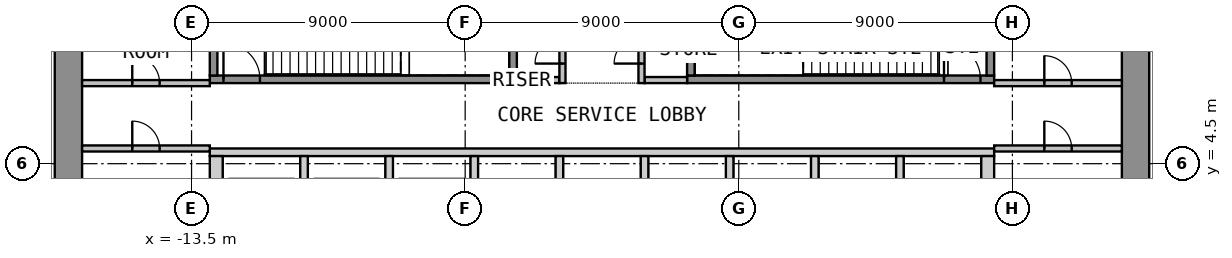
"""IFC4 building model, lengths in metres.
Left out: names, types, materials, properties, quantities, classifications, styles, units other than length and angle.
Written with IfcOpenShell. Run it as: python <this file> out.ifc"""

import sys

from ifc_helpers import new_model, si_unit, direction, frame, frame_2d, origin, place, context, subcontext, project, spatial, polyline, rectangle, outline, extrude, element, fill, save


model = new_model("IFC4")
c1 = context("Model", 3, precision=1e-05, world=origin(), true_north=direction((0.0, 1.0)))
c2 = subcontext(c1, "Body", "Model", "MODEL_VIEW")
j1 = project(units=[si_unit("LENGTHUNIT", "METRE"), si_unit("PLANEANGLEUNIT", "RADIAN")], contexts=[c1])
p1 = place(None, origin())
s1 = spatial("IfcSite", under=j1, at=p1, CompositionType="ELEMENT")
p2 = place(p1, origin())
s2 = spatial("IfcBuilding", under=s1, at=p2, CompositionType="ELEMENT")
p3 = place(p2, origin())
s3 = spatial("IfcBuildingStorey", under=s2, at=p3, CompositionType="ELEMENT", Elevation=0.0)
p4 = place(p3, frame((-17.55, -12.6, 0.0), z_axis=(0.0, 0.0, 1.0), x_axis=(0.0, 1.0, 0.0)))
e1 = element("IfcWall", 1, at=p4, inside=s3, PredefinedType="SHEAR", context=c2, shape_type="SweptSolid", body=[
    extrude(rectangle(XDim=25.2, YDim=0.9, at=frame_2d((12.6, 0.0))), origin(), (0.0, 0.0, 1.0), 5.6),
])
p5 = place(p4, frame((11.4, 0.0, 0.0)))
e2 = element("IfcOpeningElement", 2, at=p5, cuts=e1, PredefinedType="OPENING", context=c2, shape_type="SweptSolid", body=[
    extrude(rectangle(XDim=2.4, YDim=2.1, at=frame_2d((1.2, 1.05))), frame((0.0, 0.46, 0.0), z_axis=(0.0, -1.0, 0.0), x_axis=(1.0, 0.0, 0.0)), (0.0, 0.0, 1.0), 0.92),
])
p6 = place(p3, frame((17.55, -12.6, 0.0), z_axis=(0.0, 0.0, 1.0), x_axis=(0.0, 1.0, 0.0)))
e3 = element("IfcWall", 3, at=p6, inside=s3, PredefinedType="SHEAR", context=c2, shape_type="SweptSolid", body=[
    extrude(rectangle(XDim=25.2, YDim=0.9, at=frame_2d((12.6, 0.0))), origin(), (0.0, 0.0, 1.0), 5.6),
])
p7 = place(p6, frame((11.4, 0.0, 0.0)))
e4 = element("IfcOpeningElement", 4, at=p7, cuts=e3, PredefinedType="OPENING", context=c2, shape_type="SweptSolid", body=[
    extrude(rectangle(XDim=2.4, YDim=2.1, at=frame_2d((1.2, 1.05))), frame((0.0, 0.46, 0.0), z_axis=(0.0, -1.0, 0.0), x_axis=(1.0, 0.0, 0.0)), (0.0, 0.0, 1.0), 0.92),
])
p8 = place(p3, origin())
e5 = element("IfcWall", 5, at=p8, inside=s3, PredefinedType="SHEAR", context=c2, shape_type="SweptSolid", body=[
    extrude(outline(polyline([(-12.9, 4.75), (12.9, 4.75), (12.9, 5.0), (-12.9, 5.0), (-12.9, 4.75)])), origin(), (0.0, 0.0, 1.0), 5.6),
])
p9 = place(p3, origin())
e6 = element("IfcWall", 6, at=p9, inside=s3, PredefinedType="SHEAR", context=c2, shape_type="SweptSolid", body=[
    extrude(outline(polyline([(-12.9, 2.05), (-12.475, 2.05), (-12.475, 4.75), (-12.9, 4.75), (-12.9, 2.05)])), origin(), (0.0, 0.0, 1.0), 5.6),
])
p10 = place(p3, origin())
e7 = element("IfcWall", 7, at=p10, inside=s3, PredefinedType="SHEAR", context=c2, shape_type="SweptSolid", body=[
    extrude(outline(polyline([(-9.925, 2.05), (-9.675, 2.05), (-9.675, 4.75), (-9.925, 4.75), (-9.925, 2.05)])), origin(), (0.0, 0.0, 1.0), 5.6),
])
p11 = place(p3, origin())
e8 = element("IfcWall", 8, at=p11, inside=s3, PredefinedType="SHEAR", context=c2, shape_type="SweptSolid", body=[
    extrude(outline(polyline([(-7.125, 2.05), (-6.875, 2.05), (-6.875, 4.75), (-7.125, 4.75), (-7.125, 2.05)])), origin(), (0.0, 0.0, 1.0), 5.6),
])
p12 = place(p3, origin())
e9 = element("IfcWall", 9, at=p12, inside=s3, PredefinedType="SHEAR", context=c2, shape_type="SweptSolid", body=[
    extrude(outline(polyline([(-4.325, 2.05), (-4.075, 2.05), (-4.075, 4.75), (-4.325, 4.75), (-4.325, 2.05)])), origin(), (0.0, 0.0, 1.0), 5.6),
])
p13 = place(p3, origin())
e10 = element("IfcWall", 10, at=p13, inside=s3, PredefinedType="SHEAR", context=c2, shape_type="SweptSolid", body=[
    extrude(outline(polyline([(-1.525, 2.05), (-1.275, 2.05), (-1.275, 4.75), (-1.525, 4.75), (-1.525, 2.05)])), origin(), (0.0, 0.0, 1.0), 5.6),
])
p14 = place(p3, origin())
e11 = element("IfcWall", 11, at=p14, inside=s3, PredefinedType="SHEAR", context=c2, shape_type="SweptSolid", body=[
    extrude(outline(polyline([(1.275, 2.05), (1.525, 2.05), (1.525, 4.75), (1.275, 4.75), (1.275, 2.05)])), origin(), (0.0, 0.0, 1.0), 5.6),
])
p15 = place(p3, origin())
e12 = element("IfcWall", 12, at=p15, inside=s3, PredefinedType="SHEAR", context=c2, shape_type="SweptSolid", body=[
    extrude(outline(polyline([(4.075, 2.05), (4.325, 2.05), (4.325, 4.75), (4.075, 4.75), (4.075, 2.05)])), origin(), (0.0, 0.0, 1.0), 5.6),
])
p16 = place(p3, origin())
e13 = element("IfcWall", 13, at=p16, inside=s3, PredefinedType="SHEAR", context=c2, shape_type="SweptSolid", body=[
    extrude(outline(polyline([(6.875, 2.05), (7.125, 2.05), (7.125, 4.75), (6.875, 4.75), (6.875, 2.05)])), origin(), (0.0, 0.0, 1.0), 5.6),
])
p17 = place(p3, origin())
e14 = element("IfcWall", 14, at=p17, inside=s3, PredefinedType="SHEAR", context=c2, shape_type="SweptSolid", body=[
    extrude(outline(polyline([(9.675, 2.05), (9.925, 2.05), (9.925, 4.75), (9.675, 4.75), (9.675, 2.05)])), origin(), (0.0, 0.0, 1.0), 5.6),
])
p18 = place(p3, origin())
e15 = element("IfcWall", 15, at=p18, inside=s3, PredefinedType="SHEAR", context=c2, shape_type="SweptSolid", body=[
    extrude(outline(polyline([(12.475, 2.05), (12.9, 2.05), (12.9, 4.75), (12.475, 4.75), (12.475, 2.05)])), origin(), (0.0, 0.0, 1.0), 5.6),
])
p19 = place(p3, frame((-12.9, 7.275, 0.0), z_axis=(0.0, 0.0, 1.0), x_axis=(1.0, 0.0, 0.0)))
e16 = element("IfcWall", 16, at=p19, inside=s3, PredefinedType="SHEAR", context=c2, shape_type="SweptSolid", body=[
    extrude(rectangle(XDim=10.1, YDim=0.25, at=frame_2d((5.05, 0.0))), origin(), (0.0, 0.0, 1.0), 5.6),
])
p20 = place(p19, frame((0.45, 0.0, 0.0)))
e17 = element("IfcOpeningElement", 17, at=p20, cuts=e16, PredefinedType="OPENING", context=c2, shape_type="SweptSolid", body=[
    extrude(rectangle(XDim=1.2, YDim=2.1, at=frame_2d((0.6, 1.05))), frame((0.0, 0.135, 0.0), z_axis=(0.0, -1.0, 0.0), x_axis=(1.0, 0.0, 0.0)), (0.0, 0.0, 1.0), 0.27),
])
for number, where, z_axis, x_axis in (
    (18, (-12.775, 7.4, 0.0), (0.0, 0.0, 1.0), (0.0, 1.0, 0.0)),
    (19, (-2.925, 7.4, 0.0), (0.0, 0.0, 1.0), (0.0, 1.0, 0.0)),
):
    element("IfcWall", number, at=place(p3, frame(where, z_axis=z_axis, x_axis=x_axis)), inside=s3, PredefinedType="SHEAR", context=c2, shape_type="SweptSolid", body=[
        extrude(rectangle(XDim=3.25, YDim=0.25, at=frame_2d((1.625, 0.0))), origin(), (0.0, 0.0, 1.0), 5.6),
    ])
p21 = place(p3, frame((2.8, 7.275, 0.0), z_axis=(0.0, 0.0, 1.0), x_axis=(1.0, 0.0, 0.0)))
e20 = element("IfcWall", 20, at=p21, inside=s3, PredefinedType="SHEAR", context=c2, shape_type="SweptSolid", body=[
    extrude(rectangle(XDim=10.1, YDim=0.25, at=frame_2d((5.05, 0.0))), origin(), (0.0, 0.0, 1.0), 5.6),
])
p22 = place(p21, frame((8.45, 0.0, 0.0)))
e21 = element("IfcOpeningElement", 21, at=p22, cuts=e20, PredefinedType="OPENING", context=c2, shape_type="SweptSolid", body=[
    extrude(rectangle(XDim=1.2, YDim=2.1, at=frame_2d((0.6, 1.05))), frame((0.0, 0.135, 0.0), z_axis=(0.0, -1.0, 0.0), x_axis=(1.0, 0.0, 0.0)), (0.0, 0.0, 1.0), 0.27),
])
for number, where, z_axis, x_axis in (
    (22, (2.925, 7.4, 0.0), (0.0, 0.0, 1.0), (0.0, 1.0, 0.0)),
    (23, (12.775, 7.4, 0.0), (0.0, 0.0, 1.0), (0.0, 1.0, 0.0)),
):
    element("IfcWall", number, at=place(p3, frame(where, z_axis=z_axis, x_axis=x_axis)), inside=s3, PredefinedType="SHEAR", context=c2, shape_type="SweptSolid", body=[
        extrude(rectangle(XDim=3.25, YDim=0.25, at=frame_2d((1.625, 0.0))), origin(), (0.0, 0.0, 1.0), 5.6),
    ])
for number, where, z_axis, x_axis in (
    (24, (-2.8, 7.25, 0.0), (0.0, 0.0, 1.0), (1.0, 0.0, 0.0)),
    (25, (1.4, 7.25, 0.0), (0.0, 0.0, 1.0), (1.0, 0.0, 0.0)),
):
    element("IfcWall", number, at=place(p3, frame(where, z_axis=z_axis, x_axis=x_axis)), inside=s3, PredefinedType="PARTITIONING", context=c2, shape_type="SweptSolid", body=[
        extrude(rectangle(XDim=1.4, YDim=0.2, at=frame_2d((0.7, 0.0))), origin(), (0.0, 0.0, 1.0), 5.6),
    ])
p23 = place(p3, frame((-1.3, 7.15, 0.0), z_axis=(0.0, 0.0, 1.0), x_axis=(0.0, 1.0, 0.0)))
e26 = element("IfcWall", 26, at=p23, inside=s3, PredefinedType="PARTITIONING", context=c2, shape_type="SweptSolid", body=[
    extrude(rectangle(XDim=5.45, YDim=0.2, at=frame_2d((2.725, 0.0))), origin(), (0.0, 0.0, 1.0), 5.6),
])
p24 = place(p23, frame((0.643, 0.0, 0.0)))
e27 = element("IfcOpeningElement", 27, at=p24, cuts=e26, PredefinedType="OPENING", context=c2, shape_type="SweptSolid", body=[
    extrude(rectangle(XDim=0.9, YDim=2.1, at=frame_2d((0.45, 1.05))), frame((0.0, 0.11, 0.0), z_axis=(0.0, -1.0, 0.0), x_axis=(1.0, 0.0, 0.0)), (0.0, 0.0, 1.0), 0.22),
])
p25 = place(p23, frame((2.401, 0.0, 0.0)))
e28 = element("IfcOpeningElement", 28, at=p25, cuts=e26, PredefinedType="OPENING", context=c2, shape_type="SweptSolid", body=[
    extrude(rectangle(XDim=0.9, YDim=2.1, at=frame_2d((0.45, 1.05))), frame((0.0, 0.11, 0.0), z_axis=(0.0, -1.0, 0.0), x_axis=(1.0, 0.0, 0.0)), (0.0, 0.0, 1.0), 0.22),
])
p26 = place(p23, frame((4.134, 0.0, 0.0)))
e29 = element("IfcOpeningElement", 29, at=p26, cuts=e26, PredefinedType="OPENING", context=c2, shape_type="SweptSolid", body=[
    extrude(rectangle(XDim=0.9, YDim=2.1, at=frame_2d((0.45, 1.05))), frame((0.0, 0.11, 0.0), z_axis=(0.0, -1.0, 0.0), x_axis=(1.0, 0.0, 0.0)), (0.0, 0.0, 1.0), 0.22),
])
p27 = place(p3, frame((1.3, 7.15, 0.0), z_axis=(0.0, 0.0, 1.0), x_axis=(0.0, 1.0, 0.0)))
e30 = element("IfcWall", 30, at=p27, inside=s3, PredefinedType="PARTITIONING", context=c2, shape_type="SweptSolid", body=[
    extrude(rectangle(XDim=5.45, YDim=0.2, at=frame_2d((2.725, 0.0))), origin(), (0.0, 0.0, 1.0), 5.6),
])
p28 = place(p27, frame((0.643, 0.0, 0.0)))
e31 = element("IfcOpeningElement", 31, at=p28, cuts=e30, PredefinedType="OPENING", context=c2, shape_type="SweptSolid", body=[
    extrude(rectangle(XDim=0.9, YDim=2.1, at=frame_2d((0.45, 1.05))), frame((0.0, 0.11, 0.0), z_axis=(0.0, -1.0, 0.0), x_axis=(1.0, 0.0, 0.0)), (0.0, 0.0, 1.0), 0.22),
])
p29 = place(p27, frame((2.401, 0.0, 0.0)))
e32 = element("IfcOpeningElement", 32, at=p29, cuts=e30, PredefinedType="OPENING", context=c2, shape_type="SweptSolid", body=[
    extrude(rectangle(XDim=0.9, YDim=2.1, at=frame_2d((0.45, 1.05))), frame((0.0, 0.11, 0.0), z_axis=(0.0, -1.0, 0.0), x_axis=(1.0, 0.0, 0.0)), (0.0, 0.0, 1.0), 0.22),
])
p30 = place(p27, frame((4.134, 0.0, 0.0)))
e33 = element("IfcOpeningElement", 33, at=p30, cuts=e30, PredefinedType="OPENING", context=c2, shape_type="SweptSolid", body=[
    extrude(rectangle(XDim=0.9, YDim=2.1, at=frame_2d((0.45, 1.05))), frame((0.0, 0.11, 0.0), z_axis=(0.0, -1.0, 0.0), x_axis=(1.0, 0.0, 0.0)), (0.0, 0.0, 1.0), 0.22),
])
p31 = place(p3, frame((-17.1, 7.15, 0.0), z_axis=(0.0, 0.0, 1.0), x_axis=(1.0, 0.0, 0.0)))
e34 = element("IfcWall", 34, at=p31, inside=s3, PredefinedType="PARTITIONING", context=c2, shape_type="SweptSolid", body=[
    extrude(rectangle(XDim=4.2, YDim=0.2, at=frame_2d((2.1, 0.0))), origin(), (0.0, 0.0, 1.0), 5.6),
])
p32 = place(p31, frame((1.65, 0.0, 0.0)))
e35 = element("IfcOpeningElement", 35, at=p32, cuts=e34, PredefinedType="OPENING", context=c2, shape_type="SweptSolid", body=[
    extrude(rectangle(XDim=0.9, YDim=2.1, at=frame_2d((0.45, 1.05))), frame((0.0, 0.11, 0.0), z_axis=(0.0, -1.0, 0.0), x_axis=(1.0, 0.0, 0.0)), (0.0, 0.0, 1.0), 0.22),
])
p33 = place(p3, frame((-17.1, 5.0, 0.0), z_axis=(0.0, 0.0, 1.0), x_axis=(1.0, 0.0, 0.0)))
e36 = element("IfcWall", 36, at=p33, inside=s3, PredefinedType="PARTITIONING", context=c2, shape_type="SweptSolid", body=[
    extrude(rectangle(XDim=4.2, YDim=0.2, at=frame_2d((2.1, 0.0))), origin(), (0.0, 0.0, 1.0), 5.6),
])
p34 = place(p33, frame((1.65, 0.0, 0.0)))
e37 = element("IfcOpeningElement", 37, at=p34, cuts=e36, PredefinedType="OPENING", context=c2, shape_type="SweptSolid", body=[
    extrude(rectangle(XDim=0.9, YDim=2.1, at=frame_2d((0.45, 1.05))), frame((0.0, 0.11, 0.0), z_axis=(0.0, -1.0, 0.0), x_axis=(1.0, 0.0, 0.0)), (0.0, 0.0, 1.0), 0.22),
])
p35 = place(p3, frame((12.9, 7.15, 0.0), z_axis=(0.0, 0.0, 1.0), x_axis=(1.0, 0.0, 0.0)))
e38 = element("IfcWall", 38, at=p35, inside=s3, PredefinedType="PARTITIONING", context=c2, shape_type="SweptSolid", body=[
    extrude(rectangle(XDim=4.2, YDim=0.2, at=frame_2d((2.1, 0.0))), origin(), (0.0, 0.0, 1.0), 5.6),
])
p36 = place(p35, frame((1.65, 0.0, 0.0)))
e39 = element("IfcOpeningElement", 39, at=p36, cuts=e38, PredefinedType="OPENING", context=c2, shape_type="SweptSolid", body=[
    extrude(rectangle(XDim=0.9, YDim=2.1, at=frame_2d((0.45, 1.05))), frame((0.0, 0.11, 0.0), z_axis=(0.0, -1.0, 0.0), x_axis=(1.0, 0.0, 0.0)), (0.0, 0.0, 1.0), 0.22),
])
p37 = place(p3, frame((12.9, 5.0, 0.0), z_axis=(0.0, 0.0, 1.0), x_axis=(1.0, 0.0, 0.0)))
e40 = element("IfcWall", 40, at=p37, inside=s3, PredefinedType="PARTITIONING", context=c2, shape_type="SweptSolid", body=[
    extrude(rectangle(XDim=4.2, YDim=0.2, at=frame_2d((2.1, 0.0))), origin(), (0.0, 0.0, 1.0), 5.6),
])
p38 = place(p37, frame((1.65, 0.0, 0.0)))
e41 = element("IfcOpeningElement", 41, at=p38, cuts=e40, PredefinedType="OPENING", context=c2, shape_type="SweptSolid", body=[
    extrude(rectangle(XDim=0.9, YDim=2.1, at=frame_2d((0.45, 1.05))), frame((0.0, 0.11, 0.0), z_axis=(0.0, -1.0, 0.0), x_axis=(1.0, 0.0, 0.0)), (0.0, 0.0, 1.0), 0.22),
])
p39 = place(p20, origin())
e42 = element("IfcDoor", 42, at=p39, inside=s3, OperationType="SINGLE_SWING_LEFT", PredefinedType="DOOR", context=c2, shape_type="SweptSolid", body=[
    extrude(rectangle(XDim=1.2, YDim=2.1, at=frame_2d((0.6, 1.05))), frame((0.0, 0.025, 0.0), z_axis=(0.0, -1.0, 0.0), x_axis=(1.0, 0.0, 0.0)), (0.0, 0.0, 1.0), 0.05),
])
fill(e17, e42)
p40 = place(p22, origin())
e43 = element("IfcDoor", 43, at=p40, inside=s3, OperationType="SINGLE_SWING_LEFT", PredefinedType="DOOR", context=c2, shape_type="SweptSolid", body=[
    extrude(rectangle(XDim=1.2, YDim=2.1, at=frame_2d((0.6, 1.05))), frame((0.0, 0.025, 0.0), z_axis=(0.0, -1.0, 0.0), x_axis=(1.0, 0.0, 0.0)), (0.0, 0.0, 1.0), 0.05),
])
fill(e21, e43)
p41 = place(p24, origin())
e44 = element("IfcDoor", 44, at=p41, inside=s3, OperationType="SINGLE_SWING_LEFT", PredefinedType="DOOR", context=c2, shape_type="SweptSolid", body=[
    extrude(rectangle(XDim=0.9, YDim=2.1, at=frame_2d((0.45, 1.05))), frame((0.0, 0.025, 0.0), z_axis=(0.0, -1.0, 0.0), x_axis=(1.0, 0.0, 0.0)), (0.0, 0.0, 1.0), 0.05),
])
fill(e27, e44)
p42 = place(p28, origin())
e45 = element("IfcDoor", 45, at=p42, inside=s3, OperationType="SINGLE_SWING_LEFT", PredefinedType="DOOR", context=c2, shape_type="SweptSolid", body=[
    extrude(rectangle(XDim=0.9, YDim=2.1, at=frame_2d((0.45, 1.05))), frame((0.0, 0.025, 0.0), z_axis=(0.0, -1.0, 0.0), x_axis=(1.0, 0.0, 0.0)), (0.0, 0.0, 1.0), 0.05),
])
fill(e31, e45)
p43 = place(p32, origin())
e46 = element("IfcDoor", 46, at=p43, inside=s3, OperationType="SINGLE_SWING_LEFT", PredefinedType="DOOR", context=c2, shape_type="SweptSolid", body=[
    extrude(rectangle(XDim=0.9, YDim=2.1, at=frame_2d((0.45, 1.05))), frame((0.0, 0.025, 0.0), z_axis=(0.0, -1.0, 0.0), x_axis=(1.0, 0.0, 0.0)), (0.0, 0.0, 1.0), 0.05),
])
fill(e35, e46)
p44 = place(p34, origin())
e47 = element("IfcDoor", 47, at=p44, inside=s3, OperationType="SINGLE_SWING_LEFT", PredefinedType="DOOR", context=c2, shape_type="SweptSolid", body=[
    extrude(rectangle(XDim=0.9, YDim=2.1, at=frame_2d((0.45, 1.05))), frame((0.0, 0.025, 0.0), z_axis=(0.0, -1.0, 0.0), x_axis=(1.0, 0.0, 0.0)), (0.0, 0.0, 1.0), 0.05),
])
fill(e37, e47)
p45 = place(p36, origin())
e48 = element("IfcDoor", 48, at=p45, inside=s3, OperationType="SINGLE_SWING_LEFT", PredefinedType="DOOR", context=c2, shape_type="SweptSolid", body=[
    extrude(rectangle(XDim=0.9, YDim=2.1, at=frame_2d((0.45, 1.05))), frame((0.0, 0.025, 0.0), z_axis=(0.0, -1.0, 0.0), x_axis=(1.0, 0.0, 0.0)), (0.0, 0.0, 1.0), 0.05),
])
fill(e39, e48)
p46 = place(p38, origin())
e49 = element("IfcDoor", 49, at=p46, inside=s3, OperationType="SINGLE_SWING_LEFT", PredefinedType="DOOR", context=c2, shape_type="SweptSolid", body=[
    extrude(rectangle(XDim=0.9, YDim=2.1, at=frame_2d((0.45, 1.05))), frame((0.0, 0.025, 0.0), z_axis=(0.0, -1.0, 0.0), x_axis=(1.0, 0.0, 0.0)), (0.0, 0.0, 1.0), 0.05),
])
fill(e41, e49)
save(model, sys.argv[1])
